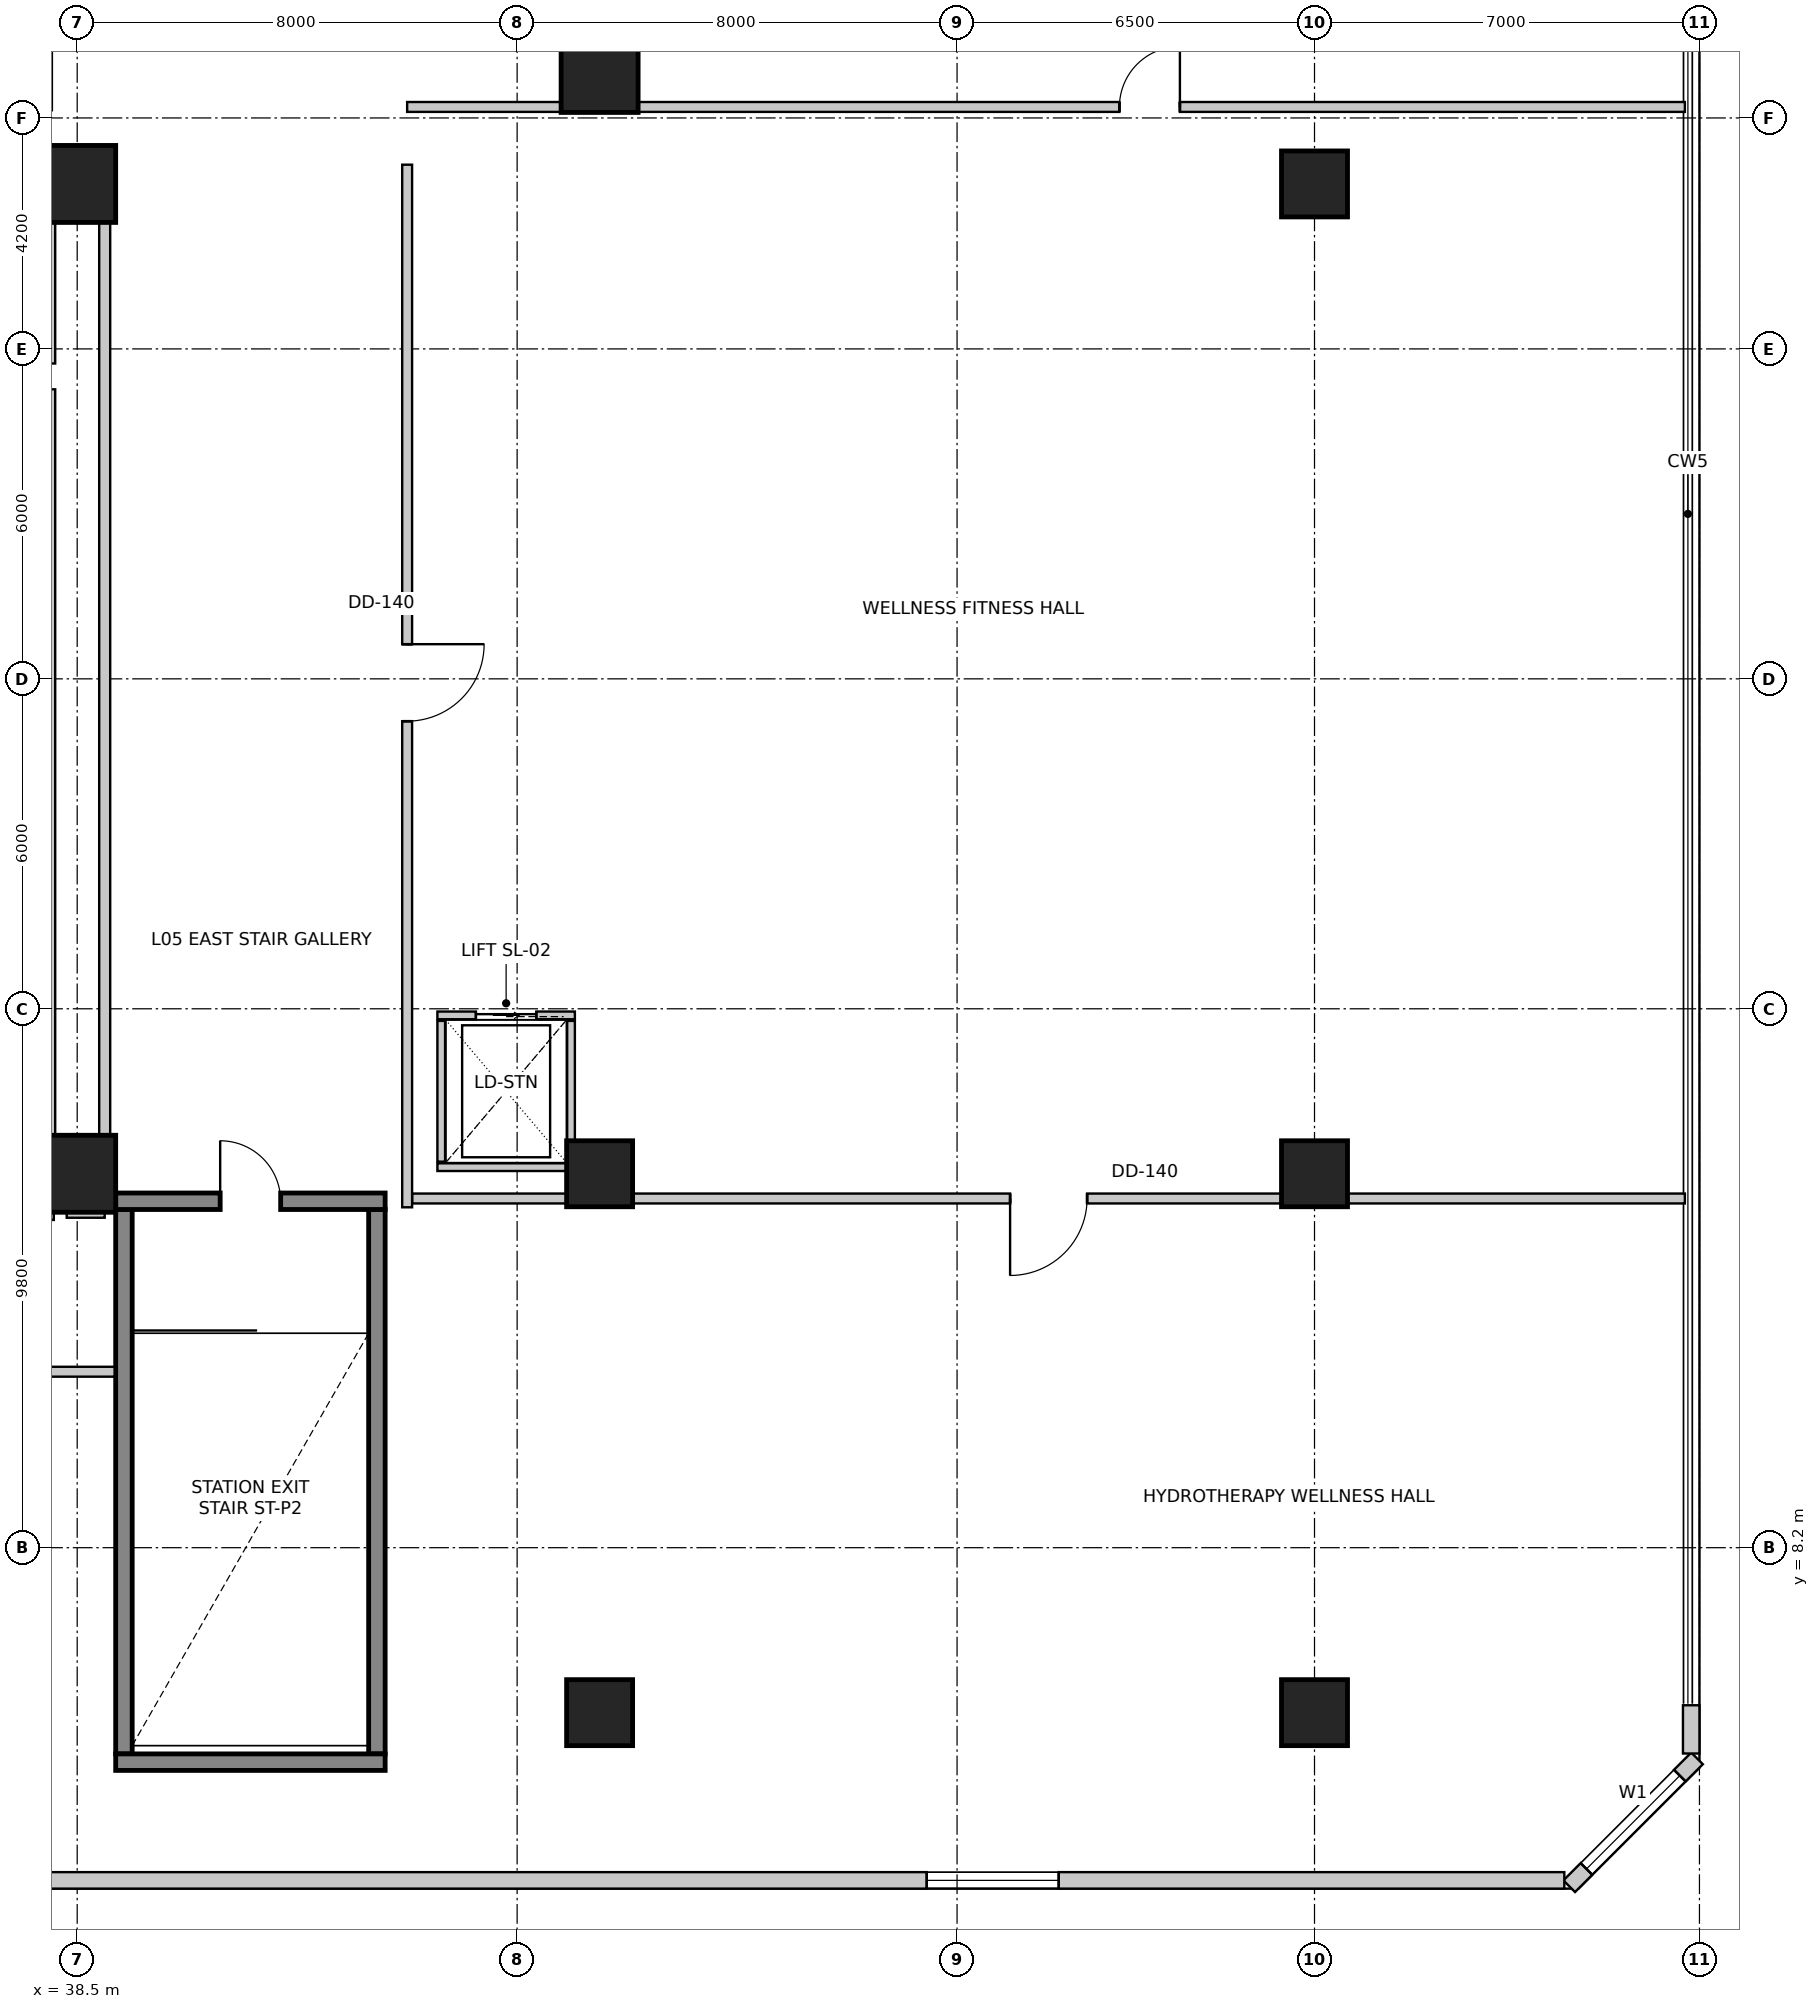
"""IFC4 building model, lengths in metres.
Left out: names, types, materials, properties, quantities, classifications, styles, units other than length and angle.
Written with IfcOpenShell. Run it as: python <this file> out.ifc"""

import sys

from ifc_helpers import new_model, si_unit, direction, frame, frame_2d, origin, origin_2d, place, context, subcontext, project, spatial, rectangle, extrude, source, transform, mapped, element, fill, save


model = new_model("IFC4")
c1 = context("Model", 3, precision=1e-05, world=origin(), true_north=direction((0.0, 1.0)))
c2 = subcontext(c1, "Body", "Model", "MODEL_VIEW")
j1 = project(units=[si_unit("LENGTHUNIT", "METRE"), si_unit("PLANEANGLEUNIT", "RADIAN")], contexts=[c1])
p1 = place(None, origin())
s1 = spatial("IfcSite", under=j1, at=p1, CompositionType="ELEMENT")
p2 = place(p1, origin())
s2 = spatial("IfcBuilding", under=s1, at=p2, CompositionType="ELEMENT")
p3 = place(p2, frame((0.0, 0.0, 21.6)))
s3 = spatial("IfcBuildingStorey", under=s2, at=p3, CompositionType="ELEMENT", Elevation=21.6)
for number, where, z_axis, x_axis in (
    (1, (39.35, 4.45, 0.0), (0.0, 0.0, 1.0), (0.0, 1.0, 0.0)),
    (2, (43.95, 4.45, 0.0), (0.0, 0.0, 1.0), (0.0, 1.0, 0.0)),
):
    element("IfcWall", number, at=place(p3, frame(where, z_axis=z_axis, x_axis=x_axis)), inside=s3, PredefinedType="SHEAR", context=c2, shape_type="SweptSolid", body=[
        extrude(rectangle(XDim=9.9, YDim=0.3, at=frame_2d((4.95, 0.0))), origin(), (0.0, 0.0, 1.0), 5.4),
    ])
p4 = place(p3, frame((39.2, 4.3, 0.0), z_axis=(0.0, 0.0, 1.0), x_axis=(1.0, 0.0, 0.0)))
e3 = element("IfcWall", 3, at=p4, inside=s3, PredefinedType="SHEAR", context=c2, shape_type="SweptSolid", body=[
    extrude(rectangle(XDim=4.9, YDim=0.3, at=frame_2d((2.45, 0.0))), origin(), (0.0, 0.0, 1.0), 5.4),
])
p5 = place(p3, frame((39.2, 14.5, 0.0), z_axis=(0.0, 0.0, 1.0), x_axis=(1.0, 0.0, 0.0)))
e4 = element("IfcWall", 4, at=p5, inside=s3, PredefinedType="SHEAR", context=c2, shape_type="SweptSolid", body=[
    extrude(rectangle(XDim=4.9, YDim=0.3, at=frame_2d((2.45, 0.0))), origin(), (0.0, 0.0, 1.0), 5.4),
])
m1 = source(origin(), c2, "Body", "SweptSolid", [
    extrude(rectangle(XDim=1.1, YDim=2.15, at=frame_2d((0.55, 1.075))), frame((0.0, 0.16, 0.0), z_axis=(0.0, -1.0, 0.0), x_axis=(1.0, 0.0, 0.0)), (0.0, 0.0, 1.0), 0.32),
])
p6 = place(p5, frame((1.9, 0.0, 0.0)))
e5 = element("IfcOpeningElement", 5, at=p6, cuts=e4, PredefinedType="OPENING", context=c2, shape_type="MappedRepresentation", body=[
    mapped(m1, transform((0.0, 0.0, 0.0), scale=1.0)),
])
m2 = source(origin(), c2, "Body", "SweptSolid", [
    extrude(rectangle(XDim=1.2, YDim=1.2, at=origin_2d()), origin(), (0.0, 0.0, 1.0), 5.4),
])
for number, where, z_axis, x_axis in (
    (6, (48.0, 5.2, 0.0), (0.0, 0.0, 1.0), (1.0, 0.0, 0.0)),
    (7, (61.0, 5.2, 0.0), (0.0, 0.0, 1.0), (1.0, 0.0, 0.0)),
):
    element("IfcColumn", number, at=place(p3, frame(where, z_axis=z_axis, x_axis=x_axis)), inside=s3, PredefinedType="COLUMN", context=c2, shape_type="MappedRepresentation", body=[
        mapped(m2, transform((0.0, 0.0, 0.0), scale=1.0)),
    ])
m3 = source(origin(), c2, "Body", "SweptSolid", [
    extrude(rectangle(XDim=1.4, YDim=1.4, at=origin_2d()), origin(), (0.0, 0.0, 1.0), 5.4),
])
p7 = place(p3, frame((38.5, 15.0, 0.0), z_axis=(0.0, 0.0, 1.0), x_axis=(1.0, 0.0, 0.0)))
e8 = element("IfcColumn", 8, at=p7, inside=s3, PredefinedType="COLUMN", context=c2, shape_type="MappedRepresentation", body=[
    mapped(m3, transform((0.0, 0.0, 0.0), scale=1.0)),
])
for number, where, z_axis, x_axis in (
    (9, (48.0, 15.0, 0.0), (0.0, 0.0, 1.0), (1.0, 0.0, 0.0)),
    (10, (61.0, 15.0, 0.0), (0.0, 0.0, 1.0), (1.0, 0.0, 0.0)),
):
    element("IfcColumn", number, at=place(p3, frame(where, z_axis=z_axis, x_axis=x_axis)), inside=s3, PredefinedType="COLUMN", context=c2, shape_type="MappedRepresentation", body=[
        mapped(m2, transform((0.0, 0.0, 0.0), scale=1.0)),
    ])
for number, where, z_axis, x_axis in (
    (11, (38.5, 33.0, 0.0), (0.0, 0.0, 1.0), (1.0, 0.0, 0.0)),
    (12, (48.0, 35.0, 0.0), (0.0, 0.0, 1.0), (1.0, 0.0, 0.0)),
):
    element("IfcColumn", number, at=place(p3, frame(where, z_axis=z_axis, x_axis=x_axis)), inside=s3, PredefinedType="COLUMN", context=c2, shape_type="MappedRepresentation", body=[
        mapped(m3, transform((0.0, 0.0, 0.0), scale=1.0)),
    ])
p8 = place(p3, frame((61.0, 33.0, 0.0), z_axis=(0.0, 0.0, 1.0), x_axis=(1.0, 0.0, 0.0)))
e13 = element("IfcColumn", 13, at=p8, inside=s3, PredefinedType="COLUMN", context=c2, shape_type="MappedRepresentation", body=[
    mapped(m2, transform((0.0, 0.0, 0.0), scale=1.0)),
])
p9 = place(p3, frame((65.632, 2.044, 0.0), z_axis=(0.0, 0.0, 1.0), x_axis=(0.707106781187, 0.707106781187, 0.0)))
e14 = element("IfcWall", 14, at=p9, inside=s3, PredefinedType="SOLIDWALL", context=c2, shape_type="SweptSolid", body=[
    extrude(rectangle(XDim=3.287, YDim=0.3, at=frame_2d((1.644, 0.0))), origin(), (0.0, 0.0, 1.0), 5.05),
])
m4 = source(origin(), c2, "Body", "SweptSolid", [
    extrude(rectangle(XDim=2.4, YDim=2.2, at=frame_2d((1.2, 1.1))), frame((0.0, 0.16, 0.0), z_axis=(0.0, -1.0, 0.0), x_axis=(1.0, 0.0, 0.0)), (0.0, 0.0, 1.0), 0.32),
])
p10 = place(p9, frame((0.444, 0.0, 0.85)))
e15 = element("IfcOpeningElement", 15, at=p10, cuts=e14, PredefinedType="OPENING", context=c2, shape_type="MappedRepresentation", body=[
    mapped(m4, transform((0.0, 0.0, 0.0), scale=1.0)),
])
p11 = place(p3, frame((67.85, 4.457, 0.0), z_axis=(0.0, 0.0, 1.0), x_axis=(0.0, 1.0, 0.0)))
e16 = element("IfcWall", 16, at=p11, inside=s3, PredefinedType="SOLIDWALL", context=c2, shape_type="SweptSolid", body=[
    extrude(rectangle(XDim=0.877, YDim=0.3, at=frame_2d((0.439, 0.0))), origin(), (0.0, 0.0, 1.0), 5.05),
])
p12 = place(p3, frame((4.457, 2.15, 0.0), z_axis=(0.0, 0.0, 1.0), x_axis=(1.0, 0.0, 0.0)))
e17 = element("IfcWall", 17, at=p12, inside=s3, PredefinedType="SOLIDWALL", context=c2, shape_type="SweptSolid", body=[
    extrude(rectangle(XDim=61.085, YDim=0.3, at=frame_2d((30.543, 0.0))), origin(), (0.0, 0.0, 1.0), 5.05),
])
p13 = place(p12, frame((9.194, 0.0, 0.85)))
e18 = element("IfcOpeningElement", 18, at=p13, cuts=e17, PredefinedType="OPENING", context=c2, shape_type="MappedRepresentation", body=[
    mapped(m4, transform((0.0, 0.0, 0.0), scale=1.0)),
])
m5 = source(origin(), c2, "Body", "SweptSolid", [
    extrude(rectangle(XDim=2.8, YDim=2.4, at=frame_2d((1.4, 1.2))), frame((0.0, 0.16, 0.0), z_axis=(0.0, -1.0, 0.0), x_axis=(1.0, 0.0, 0.0)), (0.0, 0.0, 1.0), 0.32),
])
p14 = place(p12, frame((29.143, 0.0, 0.85)))
e19 = element("IfcOpeningElement", 19, at=p14, cuts=e17, PredefinedType="OPENING", context=c2, shape_type="MappedRepresentation", body=[
    mapped(m5, transform((0.0, 0.0, 0.0), scale=1.0)),
])
p15 = place(p12, frame((49.491, 0.0, 0.85)))
e20 = element("IfcOpeningElement", 20, at=p15, cuts=e17, PredefinedType="OPENING", context=c2, shape_type="MappedRepresentation", body=[
    mapped(m4, transform((0.0, 0.0, 0.0), scale=1.0)),
])
p16 = place(p3, frame((45.05, 17.88, 0.0), z_axis=(0.0, 0.0, 1.0), x_axis=(1.0, 0.0, 0.0)))
e21 = element("IfcWall", 21, at=p16, inside=s3, PredefinedType="SOLIDWALL", context=c2, shape_type="SweptSolid", body=[
    extrude(rectangle(XDim=2.5, YDim=0.14, at=frame_2d((1.25, 0.0))), origin(), (0.0, 0.0, 1.0), 5.05),
])
m6 = source(origin(), c2, "Body", "SweptSolid", [
    extrude(rectangle(XDim=1.1, YDim=2.15, at=frame_2d((0.55, 1.075))), frame((0.0, 0.08, 0.0), z_axis=(0.0, -1.0, 0.0), x_axis=(1.0, 0.0, 0.0)), (0.0, 0.0, 1.0), 0.16),
])
p17 = place(p16, frame((0.7, 0.0, 0.0)))
e22 = element("IfcOpeningElement", 22, at=p17, cuts=e21, PredefinedType="OPENING", context=c2, shape_type="MappedRepresentation", body=[
    mapped(m6, transform((0.0, 0.0, 0.0), scale=1.0)),
])
p18 = place(p3, frame((45.05, 15.12, 0.0), z_axis=(0.0, 0.0, 1.0), x_axis=(1.0, 0.0, 0.0)))
e23 = element("IfcWall", 23, at=p18, inside=s3, PredefinedType="SOLIDWALL", context=c2, shape_type="SweptSolid", body=[
    extrude(rectangle(XDim=2.5, YDim=0.14, at=frame_2d((1.25, 0.0))), origin(), (0.0, 0.0, 1.0), 3.822),
])
for number, where, z_axis, x_axis in (
    (24, (45.12, 15.22, 0.0), (0.0, 0.0, 1.0), (0.0, 1.0, 0.0)),
    (25, (47.48, 15.22, 0.0), (0.0, 0.0, 1.0), (0.0, 1.0, 0.0)),
):
    element("IfcWall", number, at=place(p3, frame(where, z_axis=z_axis, x_axis=x_axis)), inside=s3, PredefinedType="SOLIDWALL", context=c2, shape_type="SweptSolid", body=[
        extrude(rectangle(XDim=2.56, YDim=0.14, at=frame_2d((1.28, 0.0))), origin(), (0.0, 0.0, 1.0), 5.05),
    ])
p19 = place(p3, frame((24.225, 14.25, 0.0), z_axis=(0.0, 0.0, 1.0), x_axis=(1.0, 0.0, 0.0)))
e26 = element("IfcWall", 26, at=p19, inside=s3, PredefinedType="PARTITIONING", context=c2, shape_type="SweptSolid", body=[
    extrude(rectangle(XDim=13.85, YDim=0.18, at=frame_2d((6.925, 0.0))), origin(), (0.0, 0.0, 1.0), 5.05),
])
p20 = place(p3, frame((39.18, 11.4, 0.0), z_axis=(0.0, 0.0, 1.0), x_axis=(-1.0, 0.0, 0.0)))
e27 = element("IfcWall", 27, at=p20, inside=s3, PredefinedType="PARTITIONING", context=c2, shape_type="SweptSolid", body=[
    extrude(rectangle(XDim=29.56, YDim=0.18, at=frame_2d((14.78, 0.0))), origin(), (0.0, 0.0, 1.0), 5.05),
])
m7 = source(origin(), c2, "Body", "SweptSolid", [
    extrude(rectangle(XDim=1.1, YDim=2.15, at=frame_2d((0.55, 1.075))), frame((0.0, 0.1, 0.0), z_axis=(0.0, -1.0, 0.0), x_axis=(1.0, 0.0, 0.0)), (0.0, 0.0, 1.0), 0.2),
])
p21 = place(p20, frame((14.23, 0.0, 0.0)))
e28 = element("IfcOpeningElement", 28, at=p21, cuts=e27, PredefinedType="OPENING", context=c2, shape_type="MappedRepresentation", body=[
    mapped(m7, transform((0.0, 0.0, 0.0), scale=1.0)),
])
p22 = place(p3, frame((44.5, 33.35, 0.0), z_axis=(0.0, 0.0, 1.0), x_axis=(0.0, -1.0, 0.0)))
e29 = element("IfcWall", 29, at=p22, inside=s3, PredefinedType="PARTITIONING", context=c2, shape_type="SweptSolid", body=[
    extrude(rectangle(XDim=18.96, YDim=0.18, at=frame_2d((9.48, 0.0))), origin(), (0.0, 0.0, 1.0), 3.822),
])
m8 = source(origin(), c2, "Body", "SweptSolid", [
    extrude(rectangle(XDim=1.4, YDim=2.15, at=frame_2d((0.7, 1.075))), frame((0.0, 0.1, 0.0), z_axis=(0.0, -1.0, 0.0), x_axis=(1.0, 0.0, 0.0)), (0.0, 0.0, 1.0), 0.2),
])
p23 = place(p22, frame((8.72, 0.0, 0.0)))
e30 = element("IfcOpeningElement", 30, at=p23, cuts=e29, PredefinedType="OPENING", context=c2, shape_type="MappedRepresentation", body=[
    mapped(m8, transform((0.0, 0.0, 0.0), scale=1.0)),
])
p24 = place(p3, frame((67.735, 14.55, 0.0), z_axis=(0.0, 0.0, 1.0), x_axis=(-1.0, 0.0, 0.0)))
e31 = element("IfcWall", 31, at=p24, inside=s3, PredefinedType="PARTITIONING", context=c2, shape_type="SweptSolid", body=[
    extrude(rectangle(XDim=23.141, YDim=0.18, at=frame_2d((11.571, 0.0))), origin(), (0.0, 0.0, 1.0), 3.842),
])
p25 = place(p24, frame((10.871, 0.0, 0.0)))
e32 = element("IfcOpeningElement", 32, at=p25, cuts=e31, PredefinedType="OPENING", context=c2, shape_type="MappedRepresentation", body=[
    mapped(m8, transform((0.0, 0.0, 0.0), scale=1.0)),
])
p26 = place(p3, frame((44.5, 34.4, 0.0), z_axis=(0.0, 0.0, 1.0), x_axis=(1.0, 0.0, 0.0)))
e33 = element("IfcWall", 33, at=p26, inside=s3, PredefinedType="PARTITIONING", context=c2, shape_type="SweptSolid", body=[
    extrude(rectangle(XDim=3.075, YDim=0.18, at=frame_2d((1.537, 0.0))), origin(), (0.0, 0.0, 1.0), 3.822),
])
p27 = place(p3, frame((48.39, 34.4, 0.0), z_axis=(0.0, 0.0, 1.0), x_axis=(1.0, 0.0, 0.0)))
e34 = element("IfcWall", 34, at=p27, inside=s3, PredefinedType="PARTITIONING", context=c2, shape_type="SweptSolid", body=[
    extrude(rectangle(XDim=19.345, YDim=0.18, at=frame_2d((9.673, 0.0))), origin(), (0.0, 0.0, 1.0), 3.822),
])
p28 = place(p27, frame((9.062, 0.0, 0.0)))
e35 = element("IfcOpeningElement", 35, at=p28, cuts=e34, PredefinedType="OPENING", context=c2, shape_type="MappedRepresentation", body=[
    mapped(m7, transform((0.0, 0.0, 0.0), scale=1.0)),
])
p29 = place(p3, frame((39.0, 33.412, 0.0), z_axis=(0.0, 0.0, 1.0), x_axis=(0.0, -1.0, 0.0)))
e36 = element("IfcWall", 36, at=p29, inside=s3, PredefinedType="SOLIDWALL", context=c2, shape_type="SweptSolid", body=[
    extrude(rectangle(XDim=18.78, YDim=0.2, at=frame_2d((9.39, 0.0))), origin(), (0.0, 0.0, 1.0), 3.042),
])
p30 = place(p3, frame((39.0, 14.3, 0.0), z_axis=(0.0, 0.0, 1.0), x_axis=(-1.0, 0.0, 0.0)))
e37 = element("IfcWall", 37, at=p30, inside=s3, PredefinedType="SOLIDWALL", context=c2, shape_type="SweptSolid", body=[
    extrude(rectangle(XDim=0.691, YDim=0.2, at=frame_2d((0.345, 0.0))), origin(), (0.0, 0.0, 1.0), 5.05),
])
p31 = place(p3, frame((38.0, 14.49, 0.0), z_axis=(0.0, 0.0, 1.0), x_axis=(0.0, 1.0, 0.0)))
e38 = element("IfcWall", 38, at=p31, inside=s3, PredefinedType="SOLIDWALL", context=c2, shape_type="SweptSolid", body=[
    extrude(rectangle(XDim=14.775, YDim=0.2, at=frame_2d((7.388, 0.0))), origin(), (0.0, 0.0, 1.0), 3.042),
])
p32 = place(p3, frame((38.0, 29.735, 0.0), z_axis=(0.0, 0.0, 1.0), x_axis=(0.0, 1.0, 0.0)))
e39 = element("IfcWall", 39, at=p32, inside=s3, PredefinedType="SOLIDWALL", context=c2, shape_type="SweptSolid", body=[
    extrude(rectangle(XDim=3.965, YDim=0.2, at=frame_2d((1.983, 0.0))), origin(), (0.0, 0.0, 1.0), 3.042),
])
for number, where, z_axis, x_axis in (
    (40, (48.48, 46.0, 0.0), (0.0, 0.0, 1.0), (0.0, -1.0, 0.0)),
    (41, (47.52, 34.64, 0.0), (0.0, 0.0, 1.0), (0.0, 1.0, 0.0)),
):
    element("IfcWall", number, at=place(p3, frame(where, z_axis=z_axis, x_axis=x_axis)), inside=s3, PredefinedType="SOLIDWALL", context=c2, shape_type="SweptSolid", body=[
        extrude(rectangle(XDim=11.36, YDim=0.2, at=frame_2d((5.68, 0.0))), origin(), (0.0, 0.0, 1.0), 3.042),
    ])
m9 = source(origin(), c2, "Body", "SweptSolid", [
    extrude(rectangle(XDim=2.4, YDim=2.2, at=frame_2d((1.2, 1.1))), frame((0.0, -0.015, 0.0), z_axis=(0.0, -1.0, 0.0), x_axis=(1.0, 0.0, 0.0)), (0.0, 0.0, 1.0), 0.06),
])
p33 = place(p10, origin())
e42 = element("IfcWindow", 42, at=p33, inside=s3, PartitioningType="SINGLE_PANEL", PredefinedType="WINDOW", context=c2, shape_type="MappedRepresentation", body=[
    mapped(m9, transform((0.0, 0.0, 0.0), scale=1.0)),
])
fill(e15, e42)
p34 = place(p15, origin())
e43 = element("IfcWindow", 43, at=p34, inside=s3, PartitioningType="SINGLE_PANEL", PredefinedType="WINDOW", context=c2, shape_type="MappedRepresentation", body=[
    mapped(m9, transform((0.0, 0.0, 0.0), scale=1.0)),
])
fill(e20, e43)
m10 = source(origin(), c2, "Body", "SweptSolid", [
    extrude(rectangle(XDim=1.1, YDim=2.15, at=frame_2d((0.55, 1.075))), frame((0.0, 0.025, 0.0), z_axis=(0.0, -1.0, 0.0), x_axis=(1.0, 0.0, 0.0)), (0.0, 0.0, 1.0), 0.05),
])
p35 = place(p17, origin())
e44 = element("IfcDoor", 44, at=p35, inside=s3, OperationType="SLIDING_TO_RIGHT", PredefinedType="DOOR", context=c2, shape_type="MappedRepresentation", body=[
    mapped(m10, transform((0.0, 0.0, 0.0), scale=1.0)),
])
fill(e22, e44)
m11 = source(origin(), c2, "Body", "SweptSolid", [
    extrude(rectangle(XDim=1.1, YDim=2.15, at=frame_2d((0.55, 1.075))), frame((0.0, 0.025, 0.0), z_axis=(0.0, -1.0, 0.0), x_axis=(1.0, 0.0, 0.0)), (0.0, 0.0, 1.0), 0.05),
])
p36 = place(p6, origin())
e45 = element("IfcDoor", 45, at=p36, inside=s3, OperationType="SINGLE_SWING_LEFT", PredefinedType="DOOR", context=c2, shape_type="MappedRepresentation", body=[
    mapped(m11, transform((0.0, 0.0, 0.0), scale=1.0)),
])
fill(e5, e45)
m12 = source(origin(), c2, "Body", "SweptSolid", [
    extrude(rectangle(XDim=1.4, YDim=2.15, at=frame_2d((0.7, 1.075))), frame((0.0, 0.025, 0.0), z_axis=(0.0, -1.0, 0.0), x_axis=(1.0, 0.0, 0.0)), (0.0, 0.0, 1.0), 0.05),
])
p37 = place(p23, origin())
e46 = element("IfcDoor", 46, at=p37, inside=s3, OperationType="SINGLE_SWING_LEFT", PredefinedType="DOOR", context=c2, shape_type="MappedRepresentation", body=[
    mapped(m12, transform((0.0, 0.0, 0.0), scale=1.0)),
])
fill(e30, e46)
p38 = place(p25, origin())
e47 = element("IfcDoor", 47, at=p38, inside=s3, OperationType="SINGLE_SWING_RIGHT", PredefinedType="DOOR", context=c2, shape_type="MappedRepresentation", body=[
    mapped(m12, transform((0.0, 0.0, 0.0), scale=1.0)),
])
fill(e32, e47)
p39 = place(p28, origin())
e48 = element("IfcDoor", 48, at=p39, inside=s3, OperationType="SINGLE_SWING_RIGHT", PredefinedType="DOOR", context=c2, shape_type="MappedRepresentation", body=[
    mapped(m11, transform((0.0, 0.0, 0.0), scale=1.0)),
])
fill(e35, e48)
save(model, sys.argv[1])
